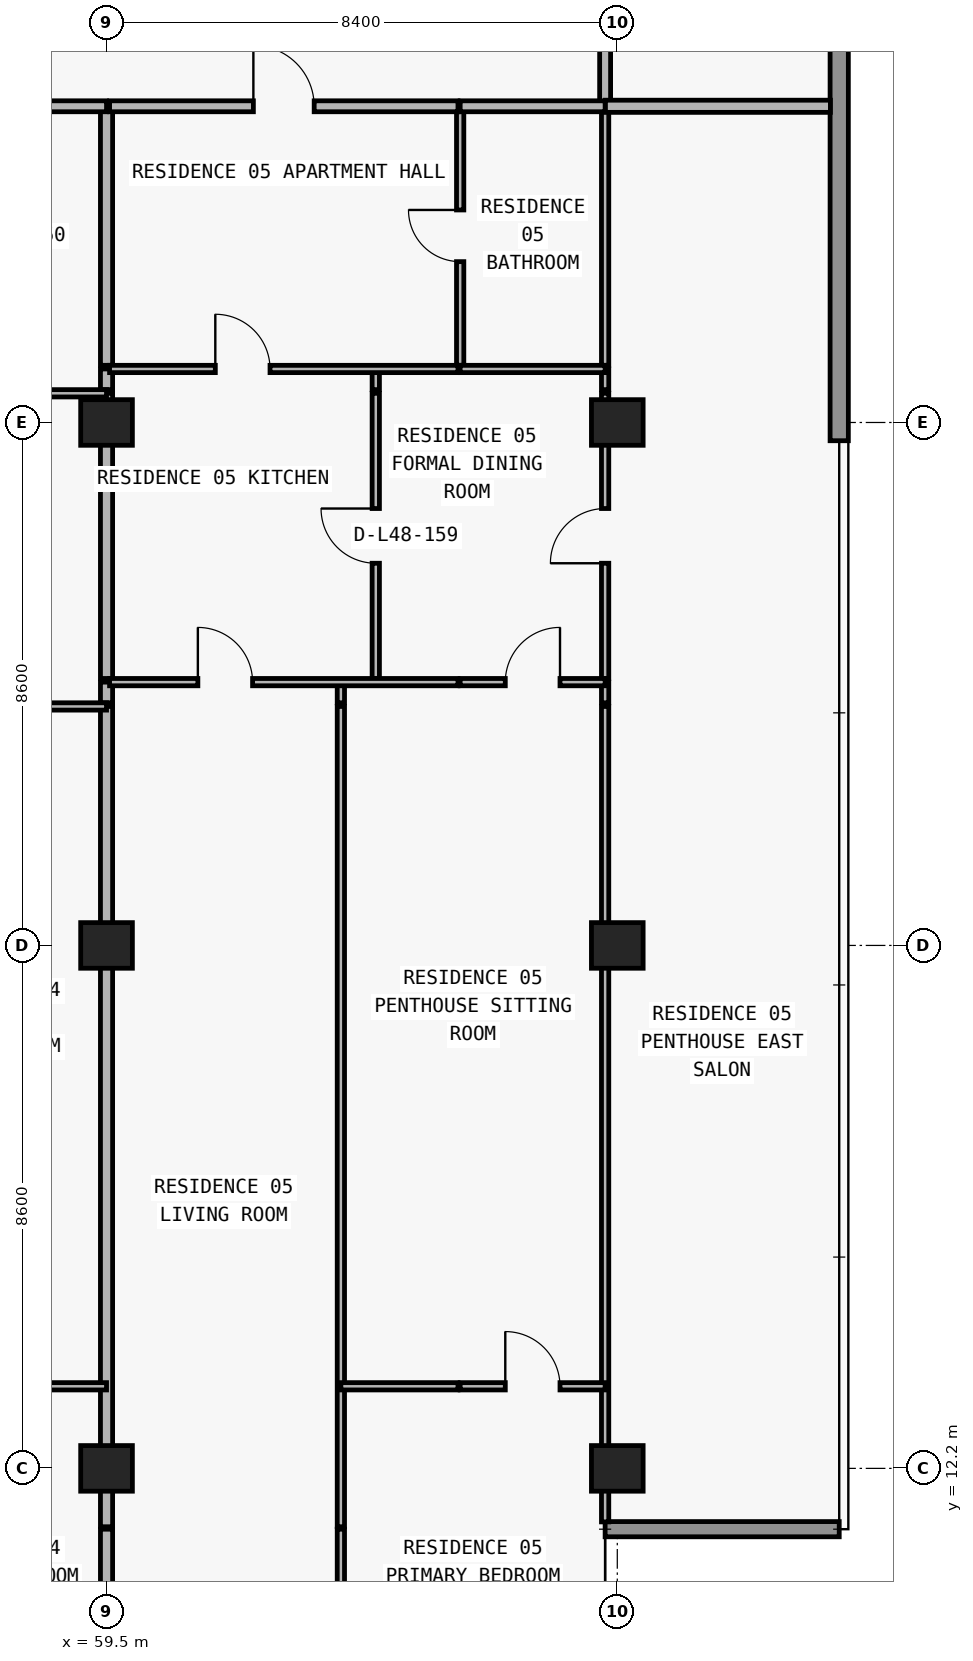
"""IFC4 building model, lengths in metres.
Left out: names, types, materials, properties, quantities, classifications, styles, units other than length and angle.
Written with IfcOpenShell. Run it as: python <this file> out.ifc"""

import sys

from ifc_helpers import new_model, si_unit, direction, frame, frame_2d, origin, origin_2d, place, context, subcontext, project, spatial, rectangle, extrude, element, fill, save


model = new_model("IFC4")
c1 = context("Model", 3, precision=1e-05, world=origin(), true_north=direction((0.0, 1.0)))
c2 = subcontext(c1, "Body", "Model", "MODEL_VIEW")
j1 = project(units=[si_unit("LENGTHUNIT", "METRE"), si_unit("PLANEANGLEUNIT", "RADIAN")], contexts=[c1])
p1 = place(None, origin())
s1 = spatial("IfcSite", under=j1, at=p1, CompositionType="ELEMENT")
p2 = place(p1, origin())
s2 = spatial("IfcBuilding", under=s1, at=p2, CompositionType="ELEMENT")
p3 = place(p2, frame((0.0, 0.0, 173.7)))
s3 = spatial("IfcBuildingStorey", under=s2, at=p3, CompositionType="ELEMENT", Elevation=173.7)
for number, where, z_axis, x_axis in (
    (1, (59.5, 12.2, 0.0), (0.0, 0.0, 1.0), (1.0, 0.0, 0.0)),
    (2, (67.9, 12.2, 0.0), (0.0, 0.0, 1.0), (1.0, 0.0, 0.0)),
    (3, (59.5, 20.8, 0.0), (0.0, 0.0, 1.0), (1.0, 0.0, 0.0)),
    (4, (67.9, 20.8, 0.0), (0.0, 0.0, 1.0), (1.0, 0.0, 0.0)),
    (5, (59.5, 29.4, 0.0), (0.0, 0.0, 1.0), (1.0, 0.0, 0.0)),
    (6, (67.9, 29.4, 0.0), (0.0, 0.0, 1.0), (1.0, 0.0, 0.0)),
):
    element("IfcColumn", number, at=place(p3, frame(where, z_axis=z_axis, x_axis=x_axis)), inside=s3, PredefinedType="COLUMN", context=c2, shape_type="SweptSolid", body=[
        extrude(rectangle(XDim=0.85, YDim=0.75, at=origin_2d()), origin(), (0.0, 0.0, 1.0), 3.05),
    ])
p4 = place(p3, frame((67.7, 11.2, 0.0), z_axis=(0.0, 0.0, 1.0), x_axis=(1.0, 0.0, 0.0)))
e7 = element("IfcWall", 7, at=p4, inside=s3, PredefinedType="ELEMENTEDWALL", context=c2, shape_type="SweptSolid", body=[
    extrude(rectangle(XDim=3.85, YDim=0.25, at=frame_2d((1.925, 0.0))), origin(), (0.0, 0.0, 1.0), 3.05),
])
p5 = place(p3, frame((71.55, 47.0, 0.0), z_axis=(0.0, 0.0, 1.0), x_axis=(0.0, -1.0, 0.0)))
e8 = element("IfcWall", 8, at=p5, inside=s3, PredefinedType="STANDARD", context=c2, shape_type="SweptSolid", body=[
    extrude(rectangle(XDim=17.9, YDim=0.3, at=frame_2d((8.95, 0.0))), origin(), (0.0, 0.0, 1.0), 3.05),
])
p6 = place(p3, frame((59.5, 7.895, 0.0), z_axis=(0.0, 0.0, 1.0), x_axis=(0.0, 1.0, 0.0)))
e9 = element("IfcWall", 9, at=p6, inside=s3, PredefinedType="PARTITIONING", context=c2, shape_type="SweptSolid", body=[
    extrude(rectangle(XDim=3.305, YDim=0.2, at=frame_2d((1.652, 0.0))), origin(), (0.0, 0.0, 1.0), 3.05),
])
p7 = place(p3, frame((59.5, 11.24, 0.0), z_axis=(0.0, 0.0, 1.0), x_axis=(0.0, 1.0, 0.0)))
e10 = element("IfcWall", 10, at=p7, inside=s3, PredefinedType="PARTITIONING", context=c2, shape_type="SweptSolid", body=[
    extrude(rectangle(XDim=13.49, YDim=0.2, at=frame_2d((6.745, 0.0))), origin(), (0.0, 0.0, 1.0), 2.263),
])
p8 = place(p3, frame((59.5, 24.79, 0.0), z_axis=(0.0, 0.0, 1.0), x_axis=(0.0, 1.0, 0.0)))
e11 = element("IfcWall", 11, at=p8, inside=s3, PredefinedType="PARTITIONING", context=c2, shape_type="SweptSolid", body=[
    extrude(rectangle(XDim=0.34, YDim=0.2, at=frame_2d((0.17, 0.0))), origin(), (0.0, 0.0, 1.0), 2.263),
])
p9 = place(p3, frame((59.5, 25.19, 0.0), z_axis=(0.0, 0.0, 1.0), x_axis=(0.0, 1.0, 0.0)))
e12 = element("IfcWall", 12, at=p9, inside=s3, PredefinedType="PARTITIONING", context=c2, shape_type="SweptSolid", body=[
    extrude(rectangle(XDim=4.69, YDim=0.2, at=frame_2d((2.345, 0.0))), origin(), (0.0, 0.0, 1.0), 2.263),
])
p10 = place(p3, frame((59.5, 29.94, 0.0), z_axis=(0.0, 0.0, 1.0), x_axis=(0.0, 1.0, 0.0)))
e13 = element("IfcWall", 13, at=p10, inside=s3, PredefinedType="PARTITIONING", context=c2, shape_type="SweptSolid", body=[
    extrude(rectangle(XDim=0.34, YDim=0.2, at=frame_2d((0.17, 0.0))), origin(), (0.0, 0.0, 1.0), 2.263),
])
p11 = place(p3, frame((59.5, 30.34, 0.0), z_axis=(0.0, 0.0, 1.0), x_axis=(0.0, 1.0, 0.0)))
e14 = element("IfcWall", 14, at=p11, inside=s3, PredefinedType="PARTITIONING", context=c2, shape_type="SweptSolid", body=[
    extrude(rectangle(XDim=4.26, YDim=0.2, at=frame_2d((2.13, 0.0))), origin(), (0.0, 0.0, 1.0), 2.263),
])
p12 = place(p3, frame((63.354, 7.895, 0.0), z_axis=(0.0, 0.0, 1.0), x_axis=(0.0, 1.0, 0.0)))
e15 = element("IfcWall", 15, at=p12, inside=s3, PredefinedType="PARTITIONING", context=c2, shape_type="SweptSolid", body=[
    extrude(rectangle(XDim=3.305, YDim=0.12, at=frame_2d((1.652, 0.0))), origin(), (0.0, 0.0, 1.0), 3.05),
])
p13 = place(p3, frame((63.354, 11.24, 0.0), z_axis=(0.0, 0.0, 1.0), x_axis=(0.0, 1.0, 0.0)))
e16 = element("IfcWall", 16, at=p13, inside=s3, PredefinedType="PARTITIONING", context=c2, shape_type="SweptSolid", body=[
    extrude(rectangle(XDim=13.49, YDim=0.12, at=frame_2d((6.745, 0.0))), origin(), (0.0, 0.0, 1.0), 3.05),
])
p14 = place(p3, frame((63.354, 24.79, 0.0), z_axis=(0.0, 0.0, 1.0), x_axis=(0.0, 1.0, 0.0)))
e17 = element("IfcWall", 17, at=p14, inside=s3, PredefinedType="PARTITIONING", context=c2, shape_type="SweptSolid", body=[
    extrude(rectangle(XDim=0.34, YDim=0.12, at=frame_2d((0.17, 0.0))), origin(), (0.0, 0.0, 1.0), 3.05),
])
p15 = place(p3, frame((63.928, 25.19, 0.0), z_axis=(0.0, 0.0, 1.0), x_axis=(0.0, 1.0, 0.0)))
e18 = element("IfcWall", 18, at=p15, inside=s3, PredefinedType="PARTITIONING", context=c2, shape_type="SweptSolid", body=[
    extrude(rectangle(XDim=4.69, YDim=0.12, at=frame_2d((2.345, 0.0))), origin(), (0.0, 0.0, 1.0), 3.05),
])
p16 = place(p15, frame((1.895, 0.0, 0.0)))
e19 = element("IfcOpeningElement", 19, at=p16, cuts=e18, PredefinedType="OPENING", context=c2, shape_type="SweptSolid", body=[
    extrude(rectangle(XDim=0.9, YDim=2.15, at=frame_2d((0.45, 1.075))), frame((0.0, 0.07, 0.0), z_axis=(0.0, -1.0, 0.0), x_axis=(1.0, 0.0, 0.0)), (0.0, 0.0, 1.0), 0.14),
])
p17 = place(p3, frame((63.928, 29.94, 0.0), z_axis=(0.0, 0.0, 1.0), x_axis=(0.0, 1.0, 0.0)))
e20 = element("IfcWall", 20, at=p17, inside=s3, PredefinedType="PARTITIONING", context=c2, shape_type="SweptSolid", body=[
    extrude(rectangle(XDim=0.34, YDim=0.12, at=frame_2d((0.17, 0.0))), origin(), (0.0, 0.0, 1.0), 3.05),
])
p18 = place(p3, frame((65.316, 30.34, 0.0), z_axis=(0.0, 0.0, 1.0), x_axis=(0.0, 1.0, 0.0)))
e21 = element("IfcWall", 21, at=p18, inside=s3, PredefinedType="PARTITIONING", context=c2, shape_type="SweptSolid", body=[
    extrude(rectangle(XDim=4.26, YDim=0.12, at=frame_2d((2.13, 0.0))), origin(), (0.0, 0.0, 1.0), 2.679),
])
p19 = place(p18, frame((1.705, 0.0, 0.0)))
e22 = element("IfcOpeningElement", 22, at=p19, cuts=e21, PredefinedType="OPENING", context=c2, shape_type="SweptSolid", body=[
    extrude(rectangle(XDim=0.85, YDim=2.1, at=frame_2d((0.425, 1.05))), frame((0.0, 0.07, 0.0), z_axis=(0.0, -1.0, 0.0), x_axis=(1.0, 0.0, 0.0)), (0.0, 0.0, 1.0), 0.14),
])
p20 = place(p3, frame((67.7, 11.32, 0.0), z_axis=(0.0, 0.0, 1.0), x_axis=(0.0, 1.0, 0.0)))
e23 = element("IfcWall", 23, at=p20, inside=s3, PredefinedType="PARTITIONING", context=c2, shape_type="SweptSolid", body=[
    extrude(rectangle(XDim=13.41, YDim=0.12, at=frame_2d((6.705, 0.0))), origin(), (0.0, 0.0, 1.0), 2.263),
])
p21 = place(p3, frame((67.7, 24.79, 0.0), z_axis=(0.0, 0.0, 1.0), x_axis=(0.0, 1.0, 0.0)))
e24 = element("IfcWall", 24, at=p21, inside=s3, PredefinedType="PARTITIONING", context=c2, shape_type="SweptSolid", body=[
    extrude(rectangle(XDim=0.34, YDim=0.12, at=frame_2d((0.17, 0.0))), origin(), (0.0, 0.0, 1.0), 2.263),
])
p22 = place(p3, frame((67.7, 25.19, 0.0), z_axis=(0.0, 0.0, 1.0), x_axis=(0.0, 1.0, 0.0)))
e25 = element("IfcWall", 25, at=p22, inside=s3, PredefinedType="PARTITIONING", context=c2, shape_type="SweptSolid", body=[
    extrude(rectangle(XDim=4.69, YDim=0.12, at=frame_2d((2.345, 0.0))), origin(), (0.0, 0.0, 1.0), 2.263),
])
p23 = place(p22, frame((1.895, 0.0, 0.0)))
e26 = element("IfcOpeningElement", 26, at=p23, cuts=e25, PredefinedType="OPENING", context=c2, shape_type="SweptSolid", body=[
    extrude(rectangle(XDim=0.9, YDim=2.15, at=frame_2d((0.45, 1.075))), frame((0.0, 0.07, 0.0), z_axis=(0.0, -1.0, 0.0), x_axis=(1.0, 0.0, 0.0)), (0.0, 0.0, 1.0), 0.14),
])
p24 = place(p3, frame((67.7, 29.94, 0.0), z_axis=(0.0, 0.0, 1.0), x_axis=(0.0, 1.0, 0.0)))
e27 = element("IfcWall", 27, at=p24, inside=s3, PredefinedType="PARTITIONING", context=c2, shape_type="SweptSolid", body=[
    extrude(rectangle(XDim=0.34, YDim=0.12, at=frame_2d((0.17, 0.0))), origin(), (0.0, 0.0, 1.0), 2.263),
])
p25 = place(p3, frame((67.7, 30.34, 0.0), z_axis=(0.0, 0.0, 1.0), x_axis=(0.0, 1.0, 0.0)))
e28 = element("IfcWall", 28, at=p25, inside=s3, PredefinedType="PARTITIONING", context=c2, shape_type="SweptSolid", body=[
    extrude(rectangle(XDim=4.26, YDim=0.12, at=frame_2d((2.13, 0.0))), origin(), (0.0, 0.0, 1.0), 2.263),
])
p26 = place(p3, frame((67.7, 34.605, 0.0), z_axis=(0.0, 0.0, 1.0), x_axis=(0.0, 1.0, 0.0)))
e29 = element("IfcWall", 29, at=p26, inside=s3, PredefinedType="PARTITIONING", context=c2, shape_type="SweptSolid", body=[
    extrude(rectangle(XDim=2.345, YDim=0.18, at=frame_2d((1.172, 0.0))), origin(), (0.0, 0.0, 1.0), 2.263),
])
p27 = place(p3, frame((55.72, 13.55, 0.0), z_axis=(0.0, 0.0, 1.0), x_axis=(1.0, 0.0, 0.0)))
e30 = element("IfcWall", 30, at=p27, inside=s3, PredefinedType="PARTITIONING", context=c2, shape_type="SweptSolid", body=[
    extrude(rectangle(XDim=3.78, YDim=0.12, at=frame_2d((1.89, 0.0))), origin(), (0.0, 0.0, 1.0), 3.05),
])
p28 = place(p27, frame((1.44, 0.0, 0.0)))
e31 = element("IfcOpeningElement", 31, at=p28, cuts=e30, PredefinedType="OPENING", context=c2, shape_type="SweptSolid", body=[
    extrude(rectangle(XDim=0.9, YDim=2.15, at=frame_2d((0.45, 1.075))), frame((0.0, 0.07, 0.0), z_axis=(0.0, -1.0, 0.0), x_axis=(1.0, 0.0, 0.0)), (0.0, 0.0, 1.0), 0.14),
])
p29 = place(p3, frame((63.354, 13.55, 0.0), z_axis=(0.0, 0.0, 1.0), x_axis=(1.0, 0.0, 0.0)))
e32 = element("IfcWall", 32, at=p29, inside=s3, PredefinedType="PARTITIONING", context=c2, shape_type="SweptSolid", body=[
    extrude(rectangle(XDim=1.926, YDim=0.12, at=frame_2d((0.963, 0.0))), origin(), (0.0, 0.0, 1.0), 3.05),
])
p30 = place(p3, frame((65.316, 13.55, 0.0), z_axis=(0.0, 0.0, 1.0), x_axis=(1.0, 0.0, 0.0)))
e33 = element("IfcWall", 33, at=p30, inside=s3, PredefinedType="PARTITIONING", context=c2, shape_type="SweptSolid", body=[
    extrude(rectangle(XDim=2.384, YDim=0.12, at=frame_2d((1.192, 0.0))), origin(), (0.0, 0.0, 1.0), 3.05),
])
p31 = place(p30, frame((0.742, 0.0, 0.0)))
e34 = element("IfcOpeningElement", 34, at=p31, cuts=e33, PredefinedType="OPENING", context=c2, shape_type="SweptSolid", body=[
    extrude(rectangle(XDim=0.9, YDim=2.15, at=frame_2d((0.45, 1.075))), frame((0.0, 0.07, 0.0), z_axis=(0.0, -1.0, 0.0), x_axis=(1.0, 0.0, 0.0)), (0.0, 0.0, 1.0), 0.14),
])
p32 = place(p3, frame((51.32, 24.73, 0.0), z_axis=(0.0, 0.0, 1.0), x_axis=(1.0, 0.0, 0.0)))
e35 = element("IfcWall", 35, at=p32, inside=s3, PredefinedType="PARTITIONING", context=c2, shape_type="SweptSolid", body=[
    extrude(rectangle(XDim=8.18, YDim=0.12, at=frame_2d((4.09, 0.0))), origin(), (0.0, 0.0, 1.0), 3.05),
])
p33 = place(p32, frame((1.583, 0.0, 0.0)))
e36 = element("IfcOpeningElement", 36, at=p33, cuts=e35, PredefinedType="OPENING", context=c2, shape_type="SweptSolid", body=[
    extrude(rectangle(XDim=0.9, YDim=2.15, at=frame_2d((0.45, 1.075))), frame((0.0, 0.07, 0.0), z_axis=(0.0, -1.0, 0.0), x_axis=(1.0, 0.0, 0.0)), (0.0, 0.0, 1.0), 0.14),
])
p34 = place(p32, frame((5.84, 0.0, 0.0)))
e37 = element("IfcOpeningElement", 37, at=p34, cuts=e35, PredefinedType="OPENING", context=c2, shape_type="SweptSolid", body=[
    extrude(rectangle(XDim=0.9, YDim=2.15, at=frame_2d((0.45, 1.075))), frame((0.0, 0.07, 0.0), z_axis=(0.0, -1.0, 0.0), x_axis=(1.0, 0.0, 0.0)), (0.0, 0.0, 1.0), 0.14),
])
p35 = place(p3, frame((59.55, 25.13, 0.0), z_axis=(0.0, 0.0, 1.0), x_axis=(1.0, 0.0, 0.0)))
e38 = element("IfcWall", 38, at=p35, inside=s3, PredefinedType="PARTITIONING", context=c2, shape_type="SweptSolid", body=[
    extrude(rectangle(XDim=5.73, YDim=0.12, at=frame_2d((2.865, 0.0))), origin(), (0.0, 0.0, 1.0), 3.05),
])
p36 = place(p35, frame((1.452, 0.0, 0.0)))
e39 = element("IfcOpeningElement", 39, at=p36, cuts=e38, PredefinedType="OPENING", context=c2, shape_type="SweptSolid", body=[
    extrude(rectangle(XDim=0.9, YDim=2.15, at=frame_2d((0.45, 1.075))), frame((0.0, 0.07, 0.0), z_axis=(0.0, -1.0, 0.0), x_axis=(1.0, 0.0, 0.0)), (0.0, 0.0, 1.0), 0.14),
])
p37 = place(p3, frame((65.316, 25.13, 0.0), z_axis=(0.0, 0.0, 1.0), x_axis=(1.0, 0.0, 0.0)))
e40 = element("IfcWall", 40, at=p37, inside=s3, PredefinedType="PARTITIONING", context=c2, shape_type="SweptSolid", body=[
    extrude(rectangle(XDim=2.384, YDim=0.12, at=frame_2d((1.192, 0.0))), origin(), (0.0, 0.0, 1.0), 3.05),
])
p38 = place(p37, frame((0.742, 0.0, 0.0)))
e41 = element("IfcOpeningElement", 41, at=p38, cuts=e40, PredefinedType="OPENING", context=c2, shape_type="SweptSolid", body=[
    extrude(rectangle(XDim=0.9, YDim=2.15, at=frame_2d((0.45, 1.075))), frame((0.0, 0.07, 0.0), z_axis=(0.0, -1.0, 0.0), x_axis=(1.0, 0.0, 0.0)), (0.0, 0.0, 1.0), 0.14),
])
p39 = place(p3, frame((51.1, 29.88, 0.0), z_axis=(0.0, 0.0, 1.0), x_axis=(1.0, 0.0, 0.0)))
e42 = element("IfcWall", 42, at=p39, inside=s3, PredefinedType="PARTITIONING", context=c2, shape_type="SweptSolid", body=[
    extrude(rectangle(XDim=8.4, YDim=0.12, at=frame_2d((4.2, 0.0))), origin(), (0.0, 0.0, 1.0), 3.05),
])
p40 = place(p39, frame((1.693, 0.0, 0.0)))
e43 = element("IfcOpeningElement", 43, at=p40, cuts=e42, PredefinedType="OPENING", context=c2, shape_type="SweptSolid", body=[
    extrude(rectangle(XDim=0.9, YDim=2.15, at=frame_2d((0.45, 1.075))), frame((0.0, 0.07, 0.0), z_axis=(0.0, -1.0, 0.0), x_axis=(1.0, 0.0, 0.0)), (0.0, 0.0, 1.0), 0.14),
])
p41 = place(p3, frame((59.55, 30.28, 0.0), z_axis=(0.0, 0.0, 1.0), x_axis=(1.0, 0.0, 0.0)))
e44 = element("IfcWall", 44, at=p41, inside=s3, PredefinedType="PARTITIONING", context=c2, shape_type="SweptSolid", body=[
    extrude(rectangle(XDim=5.73, YDim=0.12, at=frame_2d((2.865, 0.0))), origin(), (0.0, 0.0, 1.0), 3.05),
])
p42 = place(p41, frame((1.739, 0.0, 0.0)))
e45 = element("IfcOpeningElement", 45, at=p42, cuts=e44, PredefinedType="OPENING", context=c2, shape_type="SweptSolid", body=[
    extrude(rectangle(XDim=0.9, YDim=2.15, at=frame_2d((0.45, 1.075))), frame((0.0, 0.07, 0.0), z_axis=(0.0, -1.0, 0.0), x_axis=(1.0, 0.0, 0.0)), (0.0, 0.0, 1.0), 0.14),
])
p43 = place(p3, frame((65.316, 30.28, 0.0), z_axis=(0.0, 0.0, 1.0), x_axis=(1.0, 0.0, 0.0)))
e46 = element("IfcWall", 46, at=p43, inside=s3, PredefinedType="PARTITIONING", context=c2, shape_type="SweptSolid", body=[
    extrude(rectangle(XDim=2.384, YDim=0.12, at=frame_2d((1.192, 0.0))), origin(), (0.0, 0.0, 1.0), 3.05),
])
p44 = place(p3, frame((18.3, 34.6, 0.0), z_axis=(0.0, 0.0, 1.0), x_axis=(1.0, 0.0, 0.0)))
e47 = element("IfcWall", 47, at=p44, inside=s3, PredefinedType="PARTITIONING", context=c2, shape_type="SweptSolid", body=[
    extrude(rectangle(XDim=41.2, YDim=0.18, at=frame_2d((20.6, 0.0))), origin(), (0.0, 0.0, 1.0), 3.05),
])
p45 = place(p44, frame((2.67, 0.0, 0.0)))
e48 = element("IfcOpeningElement", 48, at=p45, cuts=e47, PredefinedType="OPENING", context=c2, shape_type="SweptSolid", body=[
    extrude(rectangle(XDim=1.0, YDim=2.2, at=frame_2d((0.5, 1.1))), frame((0.0, 0.1, 0.0), z_axis=(0.0, -1.0, 0.0), x_axis=(1.0, 0.0, 0.0)), (0.0, 0.0, 1.0), 0.2),
])
p46 = place(p44, frame((11.212, 0.0, 0.0)))
e49 = element("IfcOpeningElement", 49, at=p46, cuts=e47, PredefinedType="OPENING", context=c2, shape_type="SweptSolid", body=[
    extrude(rectangle(XDim=1.0, YDim=2.2, at=frame_2d((0.5, 1.1))), frame((0.0, 0.1, 0.0), z_axis=(0.0, -1.0, 0.0), x_axis=(1.0, 0.0, 0.0)), (0.0, 0.0, 1.0), 0.2),
])
p47 = place(p44, frame((35.483, 0.0, 0.0)))
e50 = element("IfcOpeningElement", 50, at=p47, cuts=e47, PredefinedType="OPENING", context=c2, shape_type="SweptSolid", body=[
    extrude(rectangle(XDim=1.0, YDim=2.2, at=frame_2d((0.5, 1.1))), frame((0.0, 0.1, 0.0), z_axis=(0.0, -1.0, 0.0), x_axis=(1.0, 0.0, 0.0)), (0.0, 0.0, 1.0), 0.2),
])
p48 = place(p3, frame((59.55, 34.6, 0.0), z_axis=(0.0, 0.0, 1.0), x_axis=(1.0, 0.0, 0.0)))
e51 = element("IfcWall", 51, at=p48, inside=s3, PredefinedType="PARTITIONING", context=c2, shape_type="SweptSolid", body=[
    extrude(rectangle(XDim=5.73, YDim=0.18, at=frame_2d((2.865, 0.0))), origin(), (0.0, 0.0, 1.0), 3.05),
])
p49 = place(p48, frame((2.365, 0.0, 0.0)))
e52 = element("IfcOpeningElement", 52, at=p49, cuts=e51, PredefinedType="OPENING", context=c2, shape_type="SweptSolid", body=[
    extrude(rectangle(XDim=1.0, YDim=2.2, at=frame_2d((0.5, 1.1))), frame((0.0, 0.1, 0.0), z_axis=(0.0, -1.0, 0.0), x_axis=(1.0, 0.0, 0.0)), (0.0, 0.0, 1.0), 0.2),
])
p50 = place(p3, frame((65.316, 34.6, 0.0), z_axis=(0.0, 0.0, 1.0), x_axis=(1.0, 0.0, 0.0)))
e53 = element("IfcWall", 53, at=p50, inside=s3, PredefinedType="PARTITIONING", context=c2, shape_type="SweptSolid", body=[
    extrude(rectangle(XDim=2.384, YDim=0.18, at=frame_2d((1.192, 0.0))), origin(), (0.0, 0.0, 1.0), 3.05),
])
p51 = place(p3, frame((67.705, 34.6, 0.0), z_axis=(0.0, 0.0, 1.0), x_axis=(1.0, 0.0, 0.0)))
e54 = element("IfcWall", 54, at=p51, inside=s3, PredefinedType="PARTITIONING", context=c2, shape_type="SweptSolid", body=[
    extrude(rectangle(XDim=3.7, YDim=0.2, at=frame_2d((1.85, 0.0))), origin(), (0.0, 0.0, 1.0), 3.05),
])
p52 = place(p49, origin())
e55 = element("IfcDoor", 55, at=p52, inside=s3, OperationType="SINGLE_SWING_LEFT", PredefinedType="DOOR", context=c2, shape_type="SweptSolid", body=[
    extrude(rectangle(XDim=1.0, YDim=2.2, at=frame_2d((0.5, 1.1))), frame((0.0, 0.025, 0.0), z_axis=(0.0, -1.0, 0.0), x_axis=(1.0, 0.0, 0.0)), (0.0, 0.0, 1.0), 0.05),
])
fill(e52, e55)
p53 = place(p19, origin())
e56 = element("IfcDoor", 56, at=p53, inside=s3, OperationType="SINGLE_SWING_RIGHT", PredefinedType="DOOR", context=c2, shape_type="SweptSolid", body=[
    extrude(rectangle(XDim=0.85, YDim=2.1, at=frame_2d((0.425, 1.05))), frame((0.0, 0.025, 0.0), z_axis=(0.0, -1.0, 0.0), x_axis=(1.0, 0.0, 0.0)), (0.0, 0.0, 1.0), 0.05),
])
fill(e22, e56)
p54 = place(p42, origin())
e57 = element("IfcDoor", 57, at=p54, inside=s3, OperationType="SINGLE_SWING_LEFT", PredefinedType="DOOR", context=c2, shape_type="SweptSolid", body=[
    extrude(rectangle(XDim=0.9, YDim=2.15, at=frame_2d((0.45, 1.075))), frame((0.0, 0.025, 0.0), z_axis=(0.0, -1.0, 0.0), x_axis=(1.0, 0.0, 0.0)), (0.0, 0.0, 1.0), 0.05),
])
fill(e45, e57)
p55 = place(p16, origin())
e58 = element("IfcDoor", 58, at=p55, inside=s3, OperationType="SINGLE_SWING_RIGHT", PredefinedType="DOOR", context=c2, shape_type="SweptSolid", body=[
    extrude(rectangle(XDim=0.9, YDim=2.15, at=frame_2d((0.45, 1.075))), frame((0.0, 0.025, 0.0), z_axis=(0.0, -1.0, 0.0), x_axis=(1.0, 0.0, 0.0)), (0.0, 0.0, 1.0), 0.05),
])
fill(e19, e58)
p56 = place(p36, origin())
e59 = element("IfcDoor", 59, at=p56, inside=s3, OperationType="SINGLE_SWING_LEFT", PredefinedType="DOOR", context=c2, shape_type="SweptSolid", body=[
    extrude(rectangle(XDim=0.9, YDim=2.15, at=frame_2d((0.45, 1.075))), frame((0.0, 0.025, 0.0), z_axis=(0.0, -1.0, 0.0), x_axis=(1.0, 0.0, 0.0)), (0.0, 0.0, 1.0), 0.05),
])
fill(e39, e59)
p57 = place(p38, origin())
e60 = element("IfcDoor", 60, at=p57, inside=s3, OperationType="SINGLE_SWING_RIGHT", PredefinedType="DOOR", context=c2, shape_type="SweptSolid", body=[
    extrude(rectangle(XDim=0.9, YDim=2.15, at=frame_2d((0.45, 1.075))), frame((0.0, 0.025, 0.0), z_axis=(0.0, -1.0, 0.0), x_axis=(1.0, 0.0, 0.0)), (0.0, 0.0, 1.0), 0.05),
])
fill(e41, e60)
p58 = place(p31, origin())
e61 = element("IfcDoor", 61, at=p58, inside=s3, OperationType="SINGLE_SWING_LEFT", PredefinedType="DOOR", context=c2, shape_type="SweptSolid", body=[
    extrude(rectangle(XDim=0.9, YDim=2.15, at=frame_2d((0.45, 1.075))), frame((0.0, 0.025, 0.0), z_axis=(0.0, -1.0, 0.0), x_axis=(1.0, 0.0, 0.0)), (0.0, 0.0, 1.0), 0.05),
])
fill(e34, e61)
p59 = place(p23, origin())
e62 = element("IfcDoor", 62, at=p59, inside=s3, OperationType="SINGLE_SWING_LEFT", PredefinedType="DOOR", context=c2, shape_type="SweptSolid", body=[
    extrude(rectangle(XDim=0.9, YDim=2.15, at=frame_2d((0.45, 1.075))), frame((0.0, 0.025, 0.0), z_axis=(0.0, -1.0, 0.0), x_axis=(1.0, 0.0, 0.0)), (0.0, 0.0, 1.0), 0.05),
])
fill(e26, e62)
save(model, sys.argv[1])
